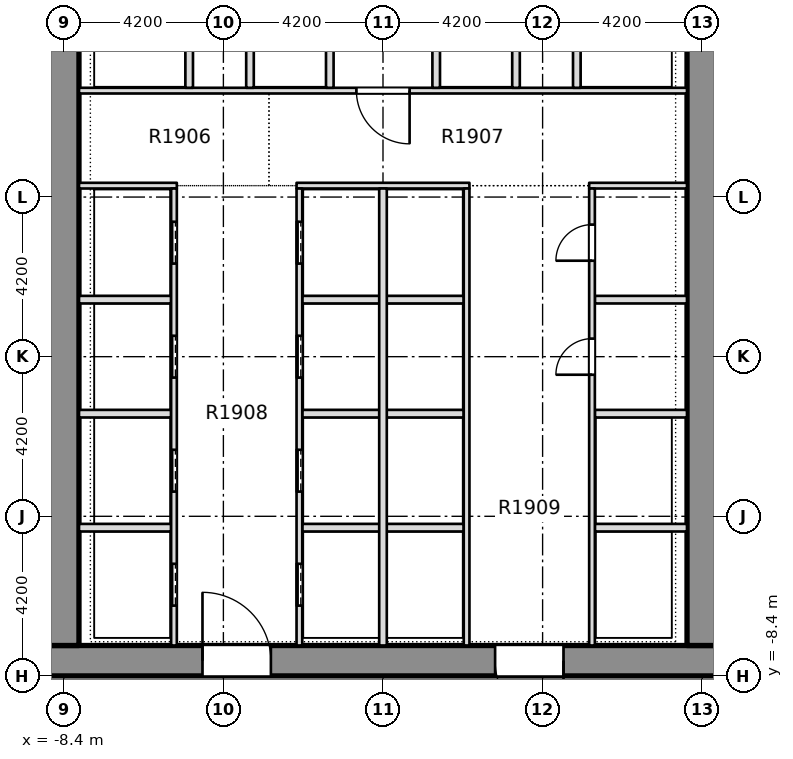
"""IFC4 building model, lengths in metres.
Left out: names, types, materials, properties, quantities, classifications, styles, units other than length and angle.
Written with IfcOpenShell. Run it as: python <this file> out.ifc"""

import sys

from ifc_helpers import new_model, si_unit, direction, frame, frame_2d, origin, place, context, subcontext, project, spatial, rectangle, extrude, element, fill, save


model = new_model("IFC4")
c1 = context("Model", 3, precision=1e-05, world=origin(), true_north=direction((0.0, 1.0)))
c2 = subcontext(c1, "Body", "Model", "MODEL_VIEW")
j1 = project(units=[si_unit("LENGTHUNIT", "METRE"), si_unit("PLANEANGLEUNIT", "RADIAN")], contexts=[c1])
p1 = place(None, origin())
s1 = spatial("IfcSite", under=j1, at=p1, CompositionType="ELEMENT")
p2 = place(p1, origin())
s2 = spatial("IfcBuilding", under=s1, at=p2, CompositionType="ELEMENT")
p3 = place(p2, frame((0.0, 0.0, 75.9)))
s3 = spatial("IfcBuildingStorey", under=s2, at=p3, CompositionType="ELEMENT", Elevation=75.9)
p4 = place(p3, frame((-11.7, -7.95, -0.5), z_axis=(0.0, 0.0, 1.0), x_axis=(1.0, 0.0, 0.0)))
e1 = element("IfcWall", 1, at=p4, inside=s3, PredefinedType="SHEAR", context=c2, shape_type="SweptSolid", body=[
    extrude(rectangle(XDim=23.4, YDim=0.9, at=frame_2d((11.7, 0.0))), origin(), (0.0, 0.0, 1.0), 4.68),
])
p5 = place(p4, frame((6.95, 0.0, 0.5)))
e2 = element("IfcOpeningElement", 2, at=p5, cuts=e1, PredefinedType="OPENING", context=c2, shape_type="SweptSolid", body=[
    extrude(rectangle(XDim=1.8, YDim=2.1, at=frame_2d((0.9, 1.05))), frame((0.0, 0.46, 0.0), z_axis=(0.0, -1.0, 0.0), x_axis=(1.0, 0.0, 0.0)), (0.0, 0.0, 1.0), 0.92),
])
p6 = place(p4, frame((14.65, 0.0, 0.5)))
e3 = element("IfcOpeningElement", 3, at=p6, cuts=e1, PredefinedType="OPENING", context=c2, shape_type="SweptSolid", body=[
    extrude(rectangle(XDim=1.8, YDim=2.1, at=frame_2d((0.9, 1.05))), frame((0.0, 0.46, 0.0), z_axis=(0.0, -1.0, 0.0), x_axis=(1.0, 0.0, 0.0)), (0.0, 0.0, 1.0), 0.92),
])
p7 = place(p3, frame((-8.4, -7.5, -0.5), z_axis=(0.0, 0.0, 1.0), x_axis=(0.0, 1.0, 0.0)))
e4 = element("IfcWall", 4, at=p7, inside=s3, PredefinedType="SHEAR", context=c2, shape_type="SweptSolid", body=[
    extrude(rectangle(XDim=28.35, YDim=0.9, at=frame_2d((14.175, 0.0))), origin(), (0.0, 0.0, 1.0), 4.68),
])
p8 = place(p7, frame((18.4, 0.0, 0.5)))
e5 = element("IfcOpeningElement", 5, at=p8, cuts=e4, PredefinedType="OPENING", context=c2, shape_type="SweptSolid", body=[
    extrude(rectangle(XDim=1.2, YDim=2.1, at=frame_2d((0.6, 1.05))), frame((0.0, 0.46, 0.0), z_axis=(0.0, -1.0, 0.0), x_axis=(1.0, 0.0, 0.0)), (0.0, 0.0, 1.0), 0.92),
])
p9 = place(p3, frame((8.4, -7.5, -0.5), z_axis=(0.0, 0.0, 1.0), x_axis=(0.0, 1.0, 0.0)))
e6 = element("IfcWall", 6, at=p9, inside=s3, PredefinedType="SHEAR", context=c2, shape_type="SweptSolid", body=[
    extrude(rectangle(XDim=28.35, YDim=0.9, at=frame_2d((14.175, 0.0))), origin(), (0.0, 0.0, 1.0), 4.68),
])
p10 = place(p9, frame((18.4, 0.0, 0.5)))
e7 = element("IfcOpeningElement", 7, at=p10, cuts=e6, PredefinedType="OPENING", context=c2, shape_type="SweptSolid", body=[
    extrude(rectangle(XDim=1.2, YDim=2.1, at=frame_2d((0.6, 1.05))), frame((0.0, 0.46, 0.0), z_axis=(0.0, -1.0, 0.0), x_axis=(1.0, 0.0, 0.0)), (0.0, 0.0, 1.0), 0.92),
])
p11 = place(p3, frame((-7.949, -4.5, 0.0), z_axis=(0.0, 0.0, 1.0), x_axis=(1.0, 0.0, 0.0)))
e8 = element("IfcWall", 8, at=p11, inside=s3, PredefinedType="PARTITIONING", context=c2, shape_type="SweptSolid", body=[
    extrude(rectangle(XDim=2.374, YDim=0.2, at=frame_2d((1.187, 0.0))), origin(), (0.0, 0.0, 1.0), 4.18),
])
p12 = place(p3, frame((-2.125, -4.5, 0.0), z_axis=(0.0, 0.0, 1.0), x_axis=(1.0, 0.0, 0.0)))
e9 = element("IfcWall", 9, at=p12, inside=s3, PredefinedType="PARTITIONING", context=c2, shape_type="SweptSolid", body=[
    extrude(rectangle(XDim=4.25, YDim=0.2, at=frame_2d((2.125, 0.0))), origin(), (0.0, 0.0, 1.0), 4.18),
])
for number, where, z_axis, x_axis in (
    (10, (5.575, -4.5, 0.0), (0.0, 0.0, 1.0), (1.0, 0.0, 0.0)),
    (11, (-7.949, -1.5, 0.0), (0.0, 0.0, 1.0), (1.0, 0.0, 0.0)),
):
    element("IfcWall", number, at=place(p3, frame(where, z_axis=z_axis, x_axis=x_axis)), inside=s3, PredefinedType="PARTITIONING", context=c2, shape_type="SweptSolid", body=[
        extrude(rectangle(XDim=2.374, YDim=0.2, at=frame_2d((1.187, 0.0))), origin(), (0.0, 0.0, 1.0), 4.18),
    ])
p13 = place(p3, frame((-2.125, -1.5, 0.0), z_axis=(0.0, 0.0, 1.0), x_axis=(1.0, 0.0, 0.0)))
e12 = element("IfcWall", 12, at=p13, inside=s3, PredefinedType="PARTITIONING", context=c2, shape_type="SweptSolid", body=[
    extrude(rectangle(XDim=4.25, YDim=0.2, at=frame_2d((2.125, 0.0))), origin(), (0.0, 0.0, 1.0), 4.18),
])
for number, where, z_axis, x_axis in (
    (13, (5.575, -1.5, 0.0), (0.0, 0.0, 1.0), (1.0, 0.0, 0.0)),
    (14, (-7.949, 1.5, 0.0), (0.0, 0.0, 1.0), (1.0, 0.0, 0.0)),
):
    element("IfcWall", number, at=place(p3, frame(where, z_axis=z_axis, x_axis=x_axis)), inside=s3, PredefinedType="PARTITIONING", context=c2, shape_type="SweptSolid", body=[
        extrude(rectangle(XDim=2.374, YDim=0.2, at=frame_2d((1.187, 0.0))), origin(), (0.0, 0.0, 1.0), 4.18),
    ])
p14 = place(p3, frame((-2.125, 1.5, 0.0), z_axis=(0.0, 0.0, 1.0), x_axis=(1.0, 0.0, 0.0)))
e15 = element("IfcWall", 15, at=p14, inside=s3, PredefinedType="PARTITIONING", context=c2, shape_type="SweptSolid", body=[
    extrude(rectangle(XDim=4.25, YDim=0.2, at=frame_2d((2.125, 0.0))), origin(), (0.0, 0.0, 1.0), 4.18),
])
p15 = place(p3, frame((-7.949, 4.5, 0.0), z_axis=(0.0, 0.0, 1.0), x_axis=(1.0, 0.0, 0.0)))
e16 = element("IfcWall", 16, at=p15, inside=s3, PredefinedType="PARTITIONING", context=c2, shape_type="SweptSolid", body=[
    extrude(rectangle(XDim=2.524, YDim=0.15, at=frame_2d((1.262, 0.0))), origin(), (0.0, 0.0, 1.0), 4.18),
])
p16 = place(p3, frame((-2.275, 4.5, 0.0), z_axis=(0.0, 0.0, 1.0), x_axis=(1.0, 0.0, 0.0)))
e17 = element("IfcWall", 17, at=p16, inside=s3, PredefinedType="PARTITIONING", context=c2, shape_type="SweptSolid", body=[
    extrude(rectangle(XDim=4.55, YDim=0.15, at=frame_2d((2.275, 0.0))), origin(), (0.0, 0.0, 1.0), 4.18),
])
p17 = place(p3, frame((5.425, 4.5, 0.0), z_axis=(0.0, 0.0, 1.0), x_axis=(1.0, 0.0, 0.0)))
e18 = element("IfcWall", 18, at=p17, inside=s3, PredefinedType="PARTITIONING", context=c2, shape_type="SweptSolid", body=[
    extrude(rectangle(XDim=2.524, YDim=0.15, at=frame_2d((1.262, 0.0))), origin(), (0.0, 0.0, 1.0), 4.18),
])
p18 = place(p3, frame((-7.949, 7.0, 0.0), z_axis=(0.0, 0.0, 1.0), x_axis=(1.0, 0.0, 0.0)))
e19 = element("IfcWall", 19, at=p18, inside=s3, PredefinedType="PARTITIONING", context=c2, shape_type="SweptSolid", body=[
    extrude(rectangle(XDim=15.898, YDim=0.15, at=frame_2d((7.949, 0.0))), origin(), (0.0, 0.0, 1.0), 4.18),
])
p19 = place(p18, frame((7.249, 0.0, 0.0)))
e20 = element("IfcOpeningElement", 20, at=p19, cuts=e19, PredefinedType="OPENING", context=c2, shape_type="SweptSolid", body=[
    extrude(rectangle(XDim=1.4, YDim=2.1, at=frame_2d((0.7, 1.05))), frame((0.0, 0.085, 0.0), z_axis=(0.0, -1.0, 0.0), x_axis=(1.0, 0.0, 0.0)), (0.0, 0.0, 1.0), 0.17),
])
p20 = place(p3, frame((-5.5, -7.499, 0.0), z_axis=(0.0, 0.0, 1.0), x_axis=(0.0, 1.0, 0.0)))
e21 = element("IfcWall", 21, at=p20, inside=s3, PredefinedType="PARTITIONING", context=c2, shape_type="SweptSolid", body=[
    extrude(rectangle(XDim=11.924, YDim=0.15, at=frame_2d((5.962, 0.0))), origin(), (0.0, 0.0, 1.0), 4.18),
])
p21 = place(p20, frame((0.949, 0.0, 0.0)))
e22 = element("IfcOpeningElement", 22, at=p21, cuts=e21, PredefinedType="OPENING", context=c2, shape_type="SweptSolid", body=[
    extrude(rectangle(XDim=1.1, YDim=2.1, at=frame_2d((0.55, 1.05))), frame((0.0, 0.085, 0.0), z_axis=(0.0, -1.0, 0.0), x_axis=(1.0, 0.0, 0.0)), (0.0, 0.0, 1.0), 0.17),
])
p22 = place(p20, frame((3.949, 0.0, 0.0)))
e23 = element("IfcOpeningElement", 23, at=p22, cuts=e21, PredefinedType="OPENING", context=c2, shape_type="SweptSolid", body=[
    extrude(rectangle(XDim=1.1, YDim=2.1, at=frame_2d((0.55, 1.05))), frame((0.0, 0.085, 0.0), z_axis=(0.0, -1.0, 0.0), x_axis=(1.0, 0.0, 0.0)), (0.0, 0.0, 1.0), 0.17),
])
p23 = place(p20, frame((6.949, 0.0, 0.0)))
e24 = element("IfcOpeningElement", 24, at=p23, cuts=e21, PredefinedType="OPENING", context=c2, shape_type="SweptSolid", body=[
    extrude(rectangle(XDim=1.1, YDim=2.1, at=frame_2d((0.55, 1.05))), frame((0.0, 0.085, 0.0), z_axis=(0.0, -1.0, 0.0), x_axis=(1.0, 0.0, 0.0)), (0.0, 0.0, 1.0), 0.17),
])
p24 = place(p20, frame((9.949, 0.0, 0.0)))
e25 = element("IfcOpeningElement", 25, at=p24, cuts=e21, PredefinedType="OPENING", context=c2, shape_type="SweptSolid", body=[
    extrude(rectangle(XDim=1.1, YDim=2.1, at=frame_2d((0.55, 1.05))), frame((0.0, 0.085, 0.0), z_axis=(0.0, -1.0, 0.0), x_axis=(1.0, 0.0, 0.0)), (0.0, 0.0, 1.0), 0.17),
])
p25 = place(p3, frame((-5.1, 7.075, 0.0), z_axis=(0.0, 0.0, 1.0), x_axis=(0.0, 1.0, 0.0)))
e26 = element("IfcWall", 26, at=p25, inside=s3, PredefinedType="PARTITIONING", context=c2, shape_type="SweptSolid", body=[
    extrude(rectangle(XDim=2.725, YDim=0.2, at=frame_2d((1.363, 0.0))), origin(), (0.0, 0.0, 1.0), 4.18),
])
p26 = place(p3, frame((-3.5, 7.075, 0.0), z_axis=(0.0, 0.0, 1.0), x_axis=(0.0, 1.0, 0.0)))
e27 = element("IfcWall", 27, at=p26, inside=s3, PredefinedType="PARTITIONING", context=c2, shape_type="SweptSolid", body=[
    extrude(rectangle(XDim=2.85, YDim=0.2, at=frame_2d((1.425, 0.0))), origin(), (0.0, 0.0, 1.0), 4.18),
])
p27 = place(p3, frame((-2.2, -7.499, 0.0), z_axis=(0.0, 0.0, 1.0), x_axis=(0.0, 1.0, 0.0)))
e28 = element("IfcWall", 28, at=p27, inside=s3, PredefinedType="PARTITIONING", context=c2, shape_type="SweptSolid", body=[
    extrude(rectangle(XDim=11.924, YDim=0.15, at=frame_2d((5.962, 0.0))), origin(), (0.0, 0.0, 1.0), 4.18),
])
p28 = place(p27, frame((0.949, 0.0, 0.0)))
e29 = element("IfcOpeningElement", 29, at=p28, cuts=e28, PredefinedType="OPENING", context=c2, shape_type="SweptSolid", body=[
    extrude(rectangle(XDim=1.1, YDim=2.1, at=frame_2d((0.55, 1.05))), frame((0.0, 0.085, 0.0), z_axis=(0.0, -1.0, 0.0), x_axis=(1.0, 0.0, 0.0)), (0.0, 0.0, 1.0), 0.17),
])
p29 = place(p27, frame((3.949, 0.0, 0.0)))
e30 = element("IfcOpeningElement", 30, at=p29, cuts=e28, PredefinedType="OPENING", context=c2, shape_type="SweptSolid", body=[
    extrude(rectangle(XDim=1.1, YDim=2.1, at=frame_2d((0.55, 1.05))), frame((0.0, 0.085, 0.0), z_axis=(0.0, -1.0, 0.0), x_axis=(1.0, 0.0, 0.0)), (0.0, 0.0, 1.0), 0.17),
])
p30 = place(p27, frame((6.949, 0.0, 0.0)))
e31 = element("IfcOpeningElement", 31, at=p30, cuts=e28, PredefinedType="OPENING", context=c2, shape_type="SweptSolid", body=[
    extrude(rectangle(XDim=1.1, YDim=2.1, at=frame_2d((0.55, 1.05))), frame((0.0, 0.085, 0.0), z_axis=(0.0, -1.0, 0.0), x_axis=(1.0, 0.0, 0.0)), (0.0, 0.0, 1.0), 0.17),
])
p31 = place(p27, frame((9.949, 0.0, 0.0)))
e32 = element("IfcOpeningElement", 32, at=p31, cuts=e28, PredefinedType="OPENING", context=c2, shape_type="SweptSolid", body=[
    extrude(rectangle(XDim=1.1, YDim=2.1, at=frame_2d((0.55, 1.05))), frame((0.0, 0.085, 0.0), z_axis=(0.0, -1.0, 0.0), x_axis=(1.0, 0.0, 0.0)), (0.0, 0.0, 1.0), 0.17),
])
p32 = place(p3, frame((-1.4, 7.075, 0.0), z_axis=(0.0, 0.0, 1.0), x_axis=(0.0, 1.0, 0.0)))
e33 = element("IfcWall", 33, at=p32, inside=s3, PredefinedType="PARTITIONING", context=c2, shape_type="SweptSolid", body=[
    extrude(rectangle(XDim=2.85, YDim=0.2, at=frame_2d((1.425, 0.0))), origin(), (0.0, 0.0, 1.0), 4.18),
])
p33 = place(p3, frame((0.0, -7.499, 0.0), z_axis=(0.0, 0.0, 1.0), x_axis=(0.0, 1.0, 0.0)))
e34 = element("IfcWall", 34, at=p33, inside=s3, PredefinedType="PARTITIONING", context=c2, shape_type="SweptSolid", body=[
    extrude(rectangle(XDim=11.924, YDim=0.2, at=frame_2d((5.962, 0.0))), origin(), (0.0, 0.0, 1.0), 4.18),
])
p34 = place(p3, frame((1.4, 7.075, 0.0), z_axis=(0.0, 0.0, 1.0), x_axis=(0.0, 1.0, 0.0)))
e35 = element("IfcWall", 35, at=p34, inside=s3, PredefinedType="PARTITIONING", context=c2, shape_type="SweptSolid", body=[
    extrude(rectangle(XDim=2.85, YDim=0.2, at=frame_2d((1.425, 0.0))), origin(), (0.0, 0.0, 1.0), 4.18),
])
p35 = place(p3, frame((2.2, -7.499, 0.0), z_axis=(0.0, 0.0, 1.0), x_axis=(0.0, 1.0, 0.0)))
e36 = element("IfcWall", 36, at=p35, inside=s3, PredefinedType="PARTITIONING", context=c2, shape_type="SweptSolid", body=[
    extrude(rectangle(XDim=11.924, YDim=0.15, at=frame_2d((5.962, 0.0))), origin(), (0.0, 0.0, 1.0), 4.18),
])
p36 = place(p3, frame((3.5, 7.075, 0.0), z_axis=(0.0, 0.0, 1.0), x_axis=(0.0, 1.0, 0.0)))
e37 = element("IfcWall", 37, at=p36, inside=s3, PredefinedType="PARTITIONING", context=c2, shape_type="SweptSolid", body=[
    extrude(rectangle(XDim=2.85, YDim=0.2, at=frame_2d((1.425, 0.0))), origin(), (0.0, 0.0, 1.0), 4.18),
])
p37 = place(p3, frame((5.1, 7.075, 0.0), z_axis=(0.0, 0.0, 1.0), x_axis=(0.0, 1.0, 0.0)))
e38 = element("IfcWall", 38, at=p37, inside=s3, PredefinedType="PARTITIONING", context=c2, shape_type="SweptSolid", body=[
    extrude(rectangle(XDim=2.725, YDim=0.2, at=frame_2d((1.363, 0.0))), origin(), (0.0, 0.0, 1.0), 4.18),
])
p38 = place(p3, frame((5.5, -7.499, 0.0), z_axis=(0.0, 0.0, 1.0), x_axis=(0.0, 1.0, 0.0)))
e39 = element("IfcWall", 39, at=p38, inside=s3, PredefinedType="PARTITIONING", context=c2, shape_type="SweptSolid", body=[
    extrude(rectangle(XDim=11.924, YDim=0.15, at=frame_2d((5.962, 0.0))), origin(), (0.0, 0.0, 1.0), 4.18),
])
p39 = place(p38, frame((8.524, 0.0, 0.0)))
e40 = element("IfcOpeningElement", 40, at=p39, cuts=e39, PredefinedType="OPENING", context=c2, shape_type="SweptSolid", body=[
    extrude(rectangle(XDim=0.95, YDim=2.1, at=frame_2d((0.475, 1.05))), frame((0.0, 0.085, 0.0), z_axis=(0.0, -1.0, 0.0), x_axis=(1.0, 0.0, 0.0)), (0.0, 0.0, 1.0), 0.17),
])
p40 = place(p21, origin())
e41 = element("IfcDoor", 41, at=p40, inside=s3, OperationType="SLIDING_TO_RIGHT", PredefinedType="DOOR", context=c2, shape_type="SweptSolid", body=[
    extrude(rectangle(XDim=1.1, YDim=2.1, at=frame_2d((0.55, 1.05))), frame((0.0, 0.025, 0.0), z_axis=(0.0, -1.0, 0.0), x_axis=(1.0, 0.0, 0.0)), (0.0, 0.0, 1.0), 0.05),
])
fill(e22, e41)
p41 = place(p22, origin())
e42 = element("IfcDoor", 42, at=p41, inside=s3, OperationType="SLIDING_TO_RIGHT", PredefinedType="DOOR", context=c2, shape_type="SweptSolid", body=[
    extrude(rectangle(XDim=1.1, YDim=2.1, at=frame_2d((0.55, 1.05))), frame((0.0, 0.025, 0.0), z_axis=(0.0, -1.0, 0.0), x_axis=(1.0, 0.0, 0.0)), (0.0, 0.0, 1.0), 0.05),
])
fill(e23, e42)
p42 = place(p23, origin())
e43 = element("IfcDoor", 43, at=p42, inside=s3, OperationType="SLIDING_TO_RIGHT", PredefinedType="DOOR", context=c2, shape_type="SweptSolid", body=[
    extrude(rectangle(XDim=1.1, YDim=2.1, at=frame_2d((0.55, 1.05))), frame((0.0, 0.025, 0.0), z_axis=(0.0, -1.0, 0.0), x_axis=(1.0, 0.0, 0.0)), (0.0, 0.0, 1.0), 0.05),
])
fill(e24, e43)
p43 = place(p24, origin())
e44 = element("IfcDoor", 44, at=p43, inside=s3, OperationType="SLIDING_TO_RIGHT", PredefinedType="DOOR", context=c2, shape_type="SweptSolid", body=[
    extrude(rectangle(XDim=1.1, YDim=2.1, at=frame_2d((0.55, 1.05))), frame((0.0, 0.025, 0.0), z_axis=(0.0, -1.0, 0.0), x_axis=(1.0, 0.0, 0.0)), (0.0, 0.0, 1.0), 0.05),
])
fill(e25, e44)
p44 = place(p28, origin())
e45 = element("IfcDoor", 45, at=p44, inside=s3, OperationType="SLIDING_TO_RIGHT", PredefinedType="DOOR", context=c2, shape_type="SweptSolid", body=[
    extrude(rectangle(XDim=1.1, YDim=2.1, at=frame_2d((0.55, 1.05))), frame((0.0, 0.025, 0.0), z_axis=(0.0, -1.0, 0.0), x_axis=(1.0, 0.0, 0.0)), (0.0, 0.0, 1.0), 0.05),
])
fill(e29, e45)
p45 = place(p29, origin())
e46 = element("IfcDoor", 46, at=p45, inside=s3, OperationType="SLIDING_TO_RIGHT", PredefinedType="DOOR", context=c2, shape_type="SweptSolid", body=[
    extrude(rectangle(XDim=1.1, YDim=2.1, at=frame_2d((0.55, 1.05))), frame((0.0, 0.025, 0.0), z_axis=(0.0, -1.0, 0.0), x_axis=(1.0, 0.0, 0.0)), (0.0, 0.0, 1.0), 0.05),
])
fill(e30, e46)
p46 = place(p30, origin())
e47 = element("IfcDoor", 47, at=p46, inside=s3, OperationType="SLIDING_TO_RIGHT", PredefinedType="DOOR", context=c2, shape_type="SweptSolid", body=[
    extrude(rectangle(XDim=1.1, YDim=2.1, at=frame_2d((0.55, 1.05))), frame((0.0, 0.025, 0.0), z_axis=(0.0, -1.0, 0.0), x_axis=(1.0, 0.0, 0.0)), (0.0, 0.0, 1.0), 0.05),
])
fill(e31, e47)
p47 = place(p31, origin())
e48 = element("IfcDoor", 48, at=p47, inside=s3, OperationType="SLIDING_TO_RIGHT", PredefinedType="DOOR", context=c2, shape_type="SweptSolid", body=[
    extrude(rectangle(XDim=1.1, YDim=2.1, at=frame_2d((0.55, 1.05))), frame((0.0, 0.025, 0.0), z_axis=(0.0, -1.0, 0.0), x_axis=(1.0, 0.0, 0.0)), (0.0, 0.0, 1.0), 0.05),
])
fill(e32, e48)
p48 = place(p39, origin())
e49 = element("IfcDoor", 49, at=p48, inside=s3, OperationType="SINGLE_SWING_LEFT", PredefinedType="DOOR", context=c2, shape_type="SweptSolid", body=[
    extrude(rectangle(XDim=0.95, YDim=2.1, at=frame_2d((0.475, 1.05))), frame((0.0, 0.025, 0.0), z_axis=(0.0, -1.0, 0.0), x_axis=(1.0, 0.0, 0.0)), (0.0, 0.0, 1.0), 0.05),
])
fill(e40, e49)
p49 = place(p19, origin())
e50 = element("IfcDoor", 50, at=p49, inside=s3, OperationType="SINGLE_SWING_RIGHT", PredefinedType="DOOR", context=c2, shape_type="SweptSolid", body=[
    extrude(rectangle(XDim=1.4, YDim=2.1, at=frame_2d((0.7, 1.05))), frame((0.0, 0.025, 0.0), z_axis=(0.0, -1.0, 0.0), x_axis=(1.0, 0.0, 0.0)), (0.0, 0.0, 1.0), 0.05),
])
fill(e20, e50)
p50 = place(p5, origin())
e51 = element("IfcDoor", 51, at=p50, inside=s3, OperationType="SINGLE_SWING_LEFT", PredefinedType="DOOR", context=c2, shape_type="SweptSolid", body=[
    extrude(rectangle(XDim=1.8, YDim=2.1, at=frame_2d((0.9, 1.05))), frame((0.0, 0.025, 0.0), z_axis=(0.0, -1.0, 0.0), x_axis=(1.0, 0.0, 0.0)), (0.0, 0.0, 1.0), 0.05),
])
fill(e2, e51)
p51 = place(p6, origin())
e52 = element("IfcDoor", 52, at=p51, inside=s3, OperationType="SINGLE_SWING_LEFT", PredefinedType="DOOR", context=c2, shape_type="SweptSolid", body=[
    extrude(rectangle(XDim=1.8, YDim=2.1, at=frame_2d((0.9, 1.05))), frame((0.0, 0.025, 0.0), z_axis=(0.0, -1.0, 0.0), x_axis=(1.0, 0.0, 0.0)), (0.0, 0.0, 1.0), 0.05),
])
fill(e3, e52)
save(model, sys.argv[1])
